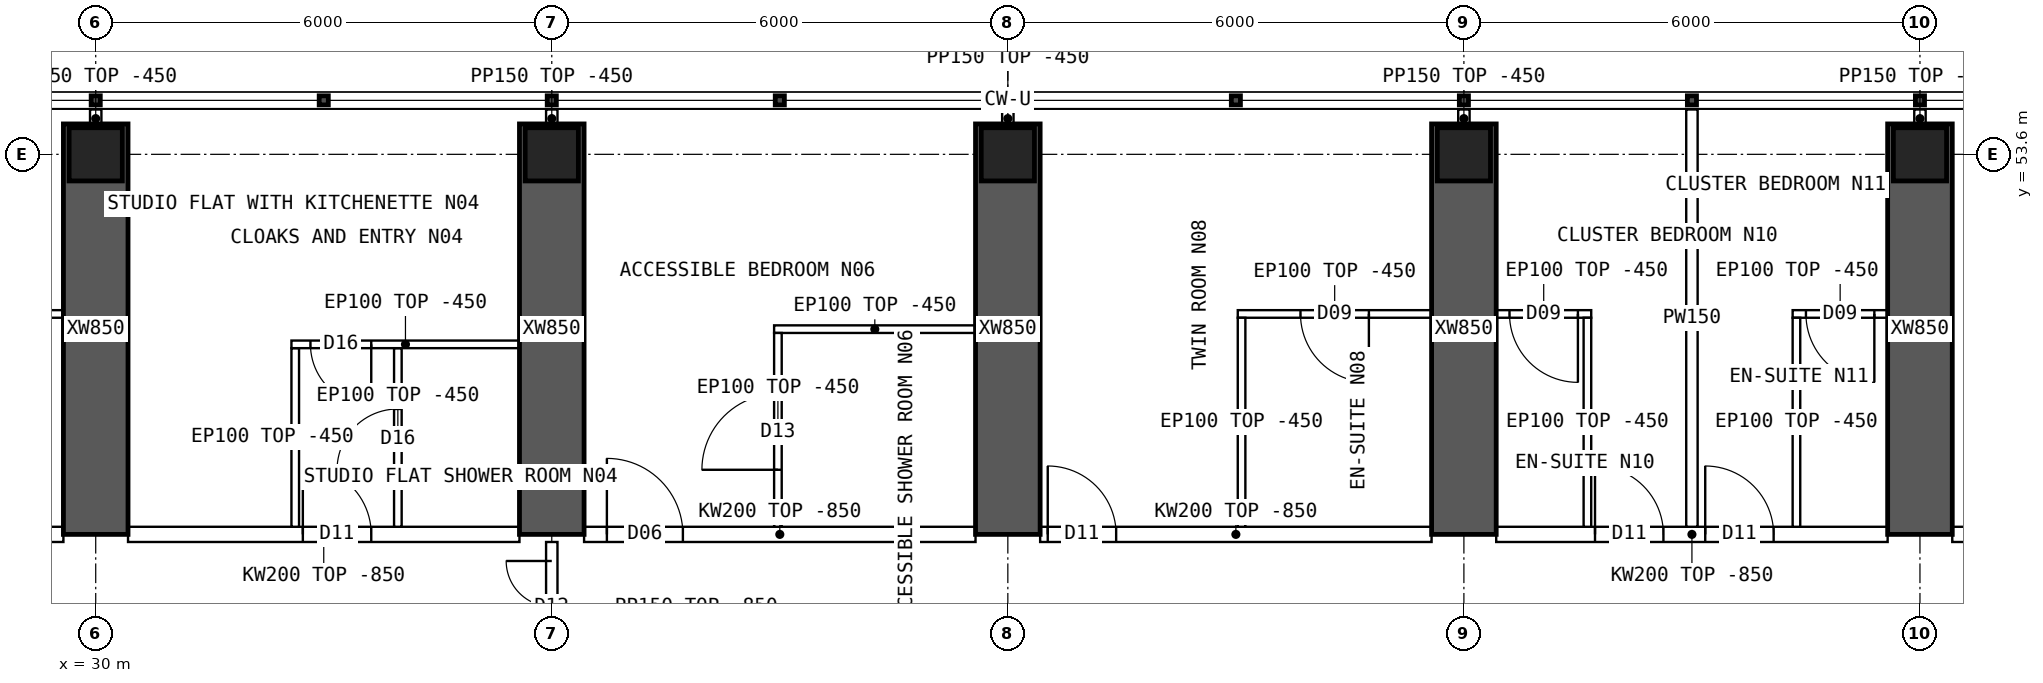
"""IFC4 building model, lengths in metres.
Left out: names, types, materials, properties, quantities, classifications, styles, units other than length and angle.
Written with IfcOpenShell. Run it as: python <this file> out.ifc"""

import sys

from ifc_helpers import new_model, si_unit, direction, frame, frame_2d, origin, origin_2d, place, context, subcontext, project, spatial, polyline, rectangle, hollow_rectangle, outline, extrude, element, fill, save


model = new_model("IFC4")
c1 = context("Model", 3, precision=1e-05, world=origin(), true_north=direction((0.0, 1.0)))
c2 = subcontext(c1, "Body", "Model", "MODEL_VIEW")
j1 = project(units=[si_unit("LENGTHUNIT", "METRE"), si_unit("PLANEANGLEUNIT", "RADIAN")], contexts=[c1])
p1 = place(None, origin())
s1 = spatial("IfcSite", under=j1, at=p1, CompositionType="ELEMENT")
p2 = place(p1, origin())
s2 = spatial("IfcBuilding", under=s1, at=p2, CompositionType="ELEMENT")
p3 = place(p2, frame((0.0, 0.0, 174.85)))
s3 = spatial("IfcBuildingStorey", under=s2, at=p3, CompositionType="ELEMENT", Elevation=174.85)
for number, where, z_axis, x_axis in (
    (1, (30.0, 53.6, 0.0), (0.0, 0.0, 1.0), (1.0, 0.0, 0.0)),
    (2, (36.0, 53.6, 0.0), (0.0, 0.0, 1.0), (1.0, 0.0, 0.0)),
    (3, (42.0, 53.6, 0.0), (0.0, 0.0, 1.0), (1.0, 0.0, 0.0)),
    (4, (48.0, 53.6, 0.0), (0.0, 0.0, 1.0), (1.0, 0.0, 0.0)),
    (5, (54.0, 53.6, 0.0), (0.0, 0.0, 1.0), (1.0, 0.0, 0.0)),
):
    element("IfcColumn", number, at=place(p3, frame(where, z_axis=z_axis, x_axis=x_axis)), inside=s3, PredefinedType="COLUMN", context=c2, shape_type="SweptSolid", body=[
        extrude(hollow_rectangle(XDim=0.7, YDim=0.7, WallThickness=0.07, at=origin_2d()), origin(), (0.0, 0.0, 1.0), 3.75),
    ])
for number, where, z_axis, x_axis in (
    (6, (30.0, 48.6, 0.0), (0.0, 0.0, 1.0), (0.0, 1.0, 0.0)),
    (7, (36.0, 48.6, 0.0), (0.0, 0.0, 1.0), (0.0, 1.0, 0.0)),
    (8, (42.0, 48.6, 0.0), (0.0, 0.0, 1.0), (0.0, 1.0, 0.0)),
    (9, (48.0, 48.6, 0.0), (0.0, 0.0, 1.0), (0.0, 1.0, 0.0)),
    (10, (54.0, 48.6, 0.0), (0.0, 0.0, 1.0), (0.0, 1.0, 0.0)),
):
    element("IfcWall", number, at=place(p3, frame(where, z_axis=z_axis, x_axis=x_axis)), inside=s3, PredefinedType="SHEAR", context=c2, shape_type="SweptSolid", body=[
        extrude(rectangle(XDim=5.4, YDim=0.85, at=frame_2d((2.7, 0.0))), origin(), (0.0, 0.0, 1.0), 3.75),
    ])
p4 = place(p3, frame((24.425, 48.6, 0.0), z_axis=(0.0, 0.0, 1.0), x_axis=(1.0, 0.0, 0.0)))
e11 = element("IfcWall", 11, at=p4, inside=s3, PredefinedType="SOLIDWALL", context=c2, shape_type="SweptSolid", body=[
    extrude(outline(polyline([(0.0, 0.0), (5.15, 0.0), (5.15, 2.9), (0.0, 2.9), (0.0, 0.0)])), frame((0.0, 0.1, 0.0), z_axis=(0.0, -1.0, 0.0), x_axis=(1.0, 0.0, 0.0)), (0.0, 0.0, 1.0), 0.2),
])
p5 = place(p4, frame((0.1, 0.0, 0.0)))
e12 = element("IfcOpeningElement", 12, at=p5, cuts=e11, PredefinedType="OPENING", context=c2, shape_type="SweptSolid", body=[
    extrude(rectangle(XDim=0.9, YDim=2.1, at=frame_2d((0.45, 1.05))), frame((0.0, 0.11, 0.0), z_axis=(0.0, -1.0, 0.0), x_axis=(1.0, 0.0, 0.0)), (0.0, 0.0, 1.0), 0.22),
])
p6 = place(p3, frame((30.425, 48.6, 0.0), z_axis=(0.0, 0.0, 1.0), x_axis=(1.0, 0.0, 0.0)))
e13 = element("IfcWall", 13, at=p6, inside=s3, PredefinedType="SOLIDWALL", context=c2, shape_type="SweptSolid", body=[
    extrude(outline(polyline([(0.0, 0.0), (5.15, 0.0), (5.15, 2.9), (0.0, 2.9), (0.0, 0.0)])), frame((0.0, 0.1, 0.0), z_axis=(0.0, -1.0, 0.0), x_axis=(1.0, 0.0, 0.0)), (0.0, 0.0, 1.0), 0.2),
])
p7 = place(p6, frame((2.3, 0.0, 0.0)))
e14 = element("IfcOpeningElement", 14, at=p7, cuts=e13, PredefinedType="OPENING", context=c2, shape_type="SweptSolid", body=[
    extrude(rectangle(XDim=0.9, YDim=2.1, at=frame_2d((0.45, 1.05))), frame((0.0, 0.11, 0.0), z_axis=(0.0, -1.0, 0.0), x_axis=(1.0, 0.0, 0.0)), (0.0, 0.0, 1.0), 0.22),
])
p8 = place(p3, frame((36.425, 48.6, 0.0), z_axis=(0.0, 0.0, 1.0), x_axis=(1.0, 0.0, 0.0)))
e15 = element("IfcWall", 15, at=p8, inside=s3, PredefinedType="SOLIDWALL", context=c2, shape_type="SweptSolid", body=[
    extrude(outline(polyline([(0.0, 0.0), (5.15, 0.0), (5.15, 2.9), (0.0, 2.9), (0.0, 0.0)])), frame((0.0, 0.1, 0.0), z_axis=(0.0, -1.0, 0.0), x_axis=(1.0, 0.0, 0.0)), (0.0, 0.0, 1.0), 0.2),
])
p9 = place(p8, frame((0.3, 0.0, 0.0)))
e16 = element("IfcOpeningElement", 16, at=p9, cuts=e15, PredefinedType="OPENING", context=c2, shape_type="SweptSolid", body=[
    extrude(rectangle(XDim=1.0, YDim=2.1, at=frame_2d((0.5, 1.05))), frame((0.0, 0.11, 0.0), z_axis=(0.0, -1.0, 0.0), x_axis=(1.0, 0.0, 0.0)), (0.0, 0.0, 1.0), 0.22),
])
p10 = place(p3, frame((42.425, 48.6, 0.0), z_axis=(0.0, 0.0, 1.0), x_axis=(1.0, 0.0, 0.0)))
e17 = element("IfcWall", 17, at=p10, inside=s3, PredefinedType="SOLIDWALL", context=c2, shape_type="SweptSolid", body=[
    extrude(outline(polyline([(0.0, 0.0), (5.15, 0.0), (5.15, 2.9), (0.0, 2.9), (0.0, 0.0)])), frame((0.0, 0.1, 0.0), z_axis=(0.0, -1.0, 0.0), x_axis=(1.0, 0.0, 0.0)), (0.0, 0.0, 1.0), 0.2),
])
p11 = place(p10, frame((0.1, 0.0, 0.0)))
e18 = element("IfcOpeningElement", 18, at=p11, cuts=e17, PredefinedType="OPENING", context=c2, shape_type="SweptSolid", body=[
    extrude(rectangle(XDim=0.9, YDim=2.1, at=frame_2d((0.45, 1.05))), frame((0.0, 0.11, 0.0), z_axis=(0.0, -1.0, 0.0), x_axis=(1.0, 0.0, 0.0)), (0.0, 0.0, 1.0), 0.22),
])
p12 = place(p3, frame((48.425, 48.6, 0.0), z_axis=(0.0, 0.0, 1.0), x_axis=(1.0, 0.0, 0.0)))
e19 = element("IfcWall", 19, at=p12, inside=s3, PredefinedType="SOLIDWALL", context=c2, shape_type="SweptSolid", body=[
    extrude(outline(polyline([(0.0, 0.0), (5.15, 0.0), (5.15, 2.9), (0.0, 2.9), (0.0, 0.0)])), frame((0.0, 0.1, 0.0), z_axis=(0.0, -1.0, 0.0), x_axis=(1.0, 0.0, 0.0)), (0.0, 0.0, 1.0), 0.2),
])
p13 = place(p12, frame((1.3, 0.0, 0.0)))
e20 = element("IfcOpeningElement", 20, at=p13, cuts=e19, PredefinedType="OPENING", context=c2, shape_type="SweptSolid", body=[
    extrude(rectangle(XDim=0.9, YDim=2.1, at=frame_2d((0.45, 1.05))), frame((0.0, 0.11, 0.0), z_axis=(0.0, -1.0, 0.0), x_axis=(1.0, 0.0, 0.0)), (0.0, 0.0, 1.0), 0.22),
])
p14 = place(p12, frame((2.75, 0.0, 0.0)))
e21 = element("IfcOpeningElement", 21, at=p14, cuts=e19, PredefinedType="OPENING", context=c2, shape_type="SweptSolid", body=[
    extrude(rectangle(XDim=0.9, YDim=2.1, at=frame_2d((0.45, 1.05))), frame((0.0, 0.11, 0.0), z_axis=(0.0, -1.0, 0.0), x_axis=(1.0, 0.0, 0.0)), (0.0, 0.0, 1.0), 0.22),
])
p15 = place(p3, frame((54.425, 48.6, 0.0), z_axis=(0.0, 0.0, 1.0), x_axis=(1.0, 0.0, 0.0)))
e22 = element("IfcWall", 22, at=p15, inside=s3, PredefinedType="SOLIDWALL", context=c2, shape_type="SweptSolid", body=[
    extrude(outline(polyline([(0.0, 0.0), (5.15, 0.0), (5.15, 2.9), (0.0, 2.9), (0.0, 0.0)])), frame((0.0, 0.1, 0.0), z_axis=(0.0, -1.0, 0.0), x_axis=(1.0, 0.0, 0.0)), (0.0, 0.0, 1.0), 0.2),
])
p16 = place(p15, frame((0.6, 0.0, 0.0)))
e23 = element("IfcOpeningElement", 23, at=p16, cuts=e22, PredefinedType="OPENING", context=c2, shape_type="SweptSolid", body=[
    extrude(rectangle(XDim=1.0, YDim=2.1, at=frame_2d((0.5, 1.05))), frame((0.0, 0.11, 0.0), z_axis=(0.0, -1.0, 0.0), x_axis=(1.0, 0.0, 0.0)), (0.0, 0.0, 1.0), 0.22),
])
p17 = place(p3, frame((27.025, 51.5, 0.0), z_axis=(0.0, 0.0, 1.0), x_axis=(1.0, 0.0, 0.0)))
e24 = element("IfcWall", 24, at=p17, inside=s3, PredefinedType="PARTITIONING", context=c2, shape_type="SweptSolid", body=[
    extrude(rectangle(XDim=2.55, YDim=0.1, at=frame_2d((1.275, 0.0))), origin(), (0.0, 0.0, 1.0), 3.3),
])
p18 = place(p17, frame((0.825, 0.0, 0.0)))
e25 = element("IfcOpeningElement", 25, at=p18, cuts=e24, PredefinedType="OPENING", context=c2, shape_type="SweptSolid", body=[
    extrude(rectangle(XDim=0.9, YDim=2.1, at=frame_2d((0.45, 1.05))), frame((0.0, 0.06, 0.0), z_axis=(0.0, -1.0, 0.0), x_axis=(1.0, 0.0, 0.0)), (0.0, 0.0, 1.0), 0.12),
])
p19 = place(p3, frame((32.575, 51.1, 0.0), z_axis=(0.0, 0.0, 1.0), x_axis=(1.0, 0.0, 0.0)))
e26 = element("IfcWall", 26, at=p19, inside=s3, PredefinedType="PARTITIONING", context=c2, shape_type="SweptSolid", body=[
    extrude(rectangle(XDim=3.0, YDim=0.1, at=frame_2d((1.5, 0.0))), origin(), (0.0, 0.0, 1.0), 3.3),
])
p20 = place(p19, frame((0.25, 0.0, 0.0)))
e27 = element("IfcOpeningElement", 27, at=p20, cuts=e26, PredefinedType="OPENING", context=c2, shape_type="SweptSolid", body=[
    extrude(rectangle(XDim=0.8, YDim=2.1, at=frame_2d((0.4, 1.05))), frame((0.0, 0.06, 0.0), z_axis=(0.0, -1.0, 0.0), x_axis=(1.0, 0.0, 0.0)), (0.0, 0.0, 1.0), 0.12),
])
p21 = place(p3, frame((32.625, 51.05, 0.0), z_axis=(0.0, 0.0, 1.0), x_axis=(0.0, -1.0, 0.0)))
e28 = element("IfcWall", 28, at=p21, inside=s3, PredefinedType="PARTITIONING", context=c2, shape_type="SweptSolid", body=[
    extrude(outline(polyline([(0.0, 0.0), (2.35, 0.0), (2.35, 2.9), (2.302, 2.9), (2.3, 3.3), (0.0, 3.3), (0.0, 0.0)])), frame((0.0, 0.05, 0.0), z_axis=(0.0, -1.0, 0.0), x_axis=(1.0, 0.0, 0.0)), (0.0, 0.0, 1.0), 0.1),
])
p22 = place(p3, frame((33.975, 51.05, 0.0), z_axis=(0.0, 0.0, 1.0), x_axis=(0.0, -1.0, 0.0)))
e29 = element("IfcWall", 29, at=p22, inside=s3, PredefinedType="PARTITIONING", context=c2, shape_type="SweptSolid", body=[
    extrude(outline(polyline([(0.0, 0.0), (2.35, 0.0), (2.35, 2.9), (2.302, 2.9), (2.3, 3.3), (0.0, 3.3), (0.0, 0.0)])), frame((0.0, 0.05, 0.0), z_axis=(0.0, -1.0, 0.0), x_axis=(1.0, 0.0, 0.0)), (0.0, 0.0, 1.0), 0.1),
])
p23 = place(p22, frame((0.8, 0.0, 0.0)))
e30 = element("IfcOpeningElement", 30, at=p23, cuts=e29, PredefinedType="OPENING", context=c2, shape_type="SweptSolid", body=[
    extrude(rectangle(XDim=0.8, YDim=2.1, at=frame_2d((0.4, 1.05))), frame((0.0, 0.06, 0.0), z_axis=(0.0, -1.0, 0.0), x_axis=(1.0, 0.0, 0.0)), (0.0, 0.0, 1.0), 0.12),
])
p24 = place(p3, frame((38.925, 51.3, 0.0), z_axis=(0.0, 0.0, 1.0), x_axis=(1.0, 0.0, 0.0)))
e31 = element("IfcWall", 31, at=p24, inside=s3, PredefinedType="PARTITIONING", context=c2, shape_type="SweptSolid", body=[
    extrude(rectangle(XDim=2.65, YDim=0.1, at=frame_2d((1.325, 0.0))), origin(), (0.0, 0.0, 1.0), 3.3),
])
p25 = place(p3, frame((38.975, 51.25, 0.0), z_axis=(0.0, 0.0, 1.0), x_axis=(0.0, -1.0, 0.0)))
e32 = element("IfcWall", 32, at=p25, inside=s3, PredefinedType="PARTITIONING", context=c2, shape_type="SweptSolid", body=[
    extrude(outline(polyline([(0.0, 0.0), (2.55, 0.0), (2.55, 2.9), (2.502, 2.9), (2.5, 3.3), (0.0, 3.3), (0.0, 0.0)])), frame((0.0, 0.05, 0.0), z_axis=(0.0, -1.0, 0.0), x_axis=(1.0, 0.0, 0.0)), (0.0, 0.0, 1.0), 0.1),
])
p26 = place(p25, frame((0.8, 0.0, 0.0)))
e33 = element("IfcOpeningElement", 33, at=p26, cuts=e32, PredefinedType="OPENING", context=c2, shape_type="SweptSolid", body=[
    extrude(rectangle(XDim=1.0, YDim=2.1, at=frame_2d((0.5, 1.05))), frame((0.0, 0.06, 0.0), z_axis=(0.0, -1.0, 0.0), x_axis=(1.0, 0.0, 0.0)), (0.0, 0.0, 1.0), 0.12),
])
p27 = place(p3, frame((45.025, 51.5, 0.0), z_axis=(0.0, 0.0, 1.0), x_axis=(1.0, 0.0, 0.0)))
e34 = element("IfcWall", 34, at=p27, inside=s3, PredefinedType="PARTITIONING", context=c2, shape_type="SweptSolid", body=[
    extrude(rectangle(XDim=2.55, YDim=0.1, at=frame_2d((1.275, 0.0))), origin(), (0.0, 0.0, 1.0), 3.3),
])
p28 = place(p27, frame((0.825, 0.0, 0.0)))
e35 = element("IfcOpeningElement", 35, at=p28, cuts=e34, PredefinedType="OPENING", context=c2, shape_type="SweptSolid", body=[
    extrude(rectangle(XDim=0.9, YDim=2.1, at=frame_2d((0.45, 1.05))), frame((0.0, 0.06, 0.0), z_axis=(0.0, -1.0, 0.0), x_axis=(1.0, 0.0, 0.0)), (0.0, 0.0, 1.0), 0.12),
])
p29 = place(p3, frame((45.075, 51.45, 0.0), z_axis=(0.0, 0.0, 1.0), x_axis=(0.0, -1.0, 0.0)))
e36 = element("IfcWall", 36, at=p29, inside=s3, PredefinedType="PARTITIONING", context=c2, shape_type="SweptSolid", body=[
    extrude(outline(polyline([(0.0, 0.0), (2.75, 0.0), (2.75, 2.9), (2.702, 2.9), (2.7, 3.3), (0.0, 3.3), (0.0, 0.0)])), frame((0.0, 0.05, 0.0), z_axis=(0.0, -1.0, 0.0), x_axis=(1.0, 0.0, 0.0)), (0.0, 0.0, 1.0), 0.1),
])
p30 = place(p3, frame((51.0, 54.19, 0.0), z_axis=(0.0, 0.0, 1.0), x_axis=(0.0, -1.0, 0.0)))
e37 = element("IfcWall", 37, at=p30, inside=s3, PredefinedType="PARTITIONING", context=c2, shape_type="SweptSolid", body=[
    extrude(outline(polyline([(0.0, 0.0), (5.49, 0.0), (5.49, 2.9), (5.442, 2.9), (5.44, 3.3), (0.792, 3.3), (0.79, 2.9), (0.392, 2.9), (0.39, 3.3), (0.0, 3.3), (0.0, 0.0)])), frame((0.0, 0.075, 0.0), z_axis=(0.0, -1.0, 0.0), x_axis=(1.0, 0.0, 0.0)), (0.0, 0.0, 1.0), 0.15),
])
p31 = place(p3, frame((48.425, 51.5, 0.0), z_axis=(0.0, 0.0, 1.0), x_axis=(1.0, 0.0, 0.0)))
e38 = element("IfcWall", 38, at=p31, inside=s3, PredefinedType="PARTITIONING", context=c2, shape_type="SweptSolid", body=[
    extrude(rectangle(XDim=1.25, YDim=0.1, at=frame_2d((0.625, 0.0))), origin(), (0.0, 0.0, 1.0), 3.3),
])
p32 = place(p31, frame((0.175, 0.0, 0.0)))
e39 = element("IfcOpeningElement", 39, at=p32, cuts=e38, PredefinedType="OPENING", context=c2, shape_type="SweptSolid", body=[
    extrude(rectangle(XDim=0.9, YDim=2.1, at=frame_2d((0.45, 1.05))), frame((0.0, 0.06, 0.0), z_axis=(0.0, -1.0, 0.0), x_axis=(1.0, 0.0, 0.0)), (0.0, 0.0, 1.0), 0.12),
])
p33 = place(p3, frame((49.625, 51.45, 0.0), z_axis=(0.0, 0.0, 1.0), x_axis=(0.0, -1.0, 0.0)))
e40 = element("IfcWall", 40, at=p33, inside=s3, PredefinedType="PARTITIONING", context=c2, shape_type="SweptSolid", body=[
    extrude(outline(polyline([(0.0, 0.0), (2.75, 0.0), (2.75, 2.9), (2.702, 2.9), (2.7, 3.3), (0.0, 3.3), (0.0, 0.0)])), frame((0.0, 0.05, 0.0), z_axis=(0.0, -1.0, 0.0), x_axis=(1.0, 0.0, 0.0)), (0.0, 0.0, 1.0), 0.1),
])
p34 = place(p3, frame((52.325, 51.5, 0.0), z_axis=(0.0, 0.0, 1.0), x_axis=(1.0, 0.0, 0.0)))
e41 = element("IfcWall", 41, at=p34, inside=s3, PredefinedType="PARTITIONING", context=c2, shape_type="SweptSolid", body=[
    extrude(rectangle(XDim=1.25, YDim=0.1, at=frame_2d((0.625, 0.0))), origin(), (0.0, 0.0, 1.0), 3.3),
])
p35 = place(p34, frame((0.175, 0.0, 0.0)))
e42 = element("IfcOpeningElement", 42, at=p35, cuts=e41, PredefinedType="OPENING", context=c2, shape_type="SweptSolid", body=[
    extrude(rectangle(XDim=0.9, YDim=2.1, at=frame_2d((0.45, 1.05))), frame((0.0, 0.06, 0.0), z_axis=(0.0, -1.0, 0.0), x_axis=(1.0, 0.0, 0.0)), (0.0, 0.0, 1.0), 0.12),
])
p36 = place(p3, frame((52.375, 51.45, 0.0), z_axis=(0.0, 0.0, 1.0), x_axis=(0.0, -1.0, 0.0)))
e43 = element("IfcWall", 43, at=p36, inside=s3, PredefinedType="PARTITIONING", context=c2, shape_type="SweptSolid", body=[
    extrude(outline(polyline([(0.0, 0.0), (2.75, 0.0), (2.75, 2.9), (2.702, 2.9), (2.7, 3.3), (0.0, 3.3), (0.0, 0.0)])), frame((0.0, 0.05, 0.0), z_axis=(0.0, -1.0, 0.0), x_axis=(1.0, 0.0, 0.0)), (0.0, 0.0, 1.0), 0.1),
])
p37 = place(p3, frame((36.0, 46.8, 0.0), z_axis=(0.0, 0.0, 1.0), x_axis=(0.0, 1.0, 0.0)))
e44 = element("IfcWall", 44, at=p37, inside=s3, PredefinedType="PARTITIONING", context=c2, shape_type="SweptSolid", body=[
    extrude(outline(polyline([(0.0, 0.0), (1.7, 0.0), (1.7, 2.9), (0.0, 2.9), (0.0, 0.0)])), frame((0.0, 0.075, 0.0), z_axis=(0.0, -1.0, 0.0), x_axis=(1.0, 0.0, 0.0)), (0.0, 0.0, 1.0), 0.15),
])
p38 = place(p37, frame((0.25, 0.0, 0.0)))
e45 = element("IfcOpeningElement", 45, at=p38, cuts=e44, PredefinedType="OPENING", context=c2, shape_type="SweptSolid", body=[
    extrude(rectangle(XDim=1.2, YDim=2.1, at=frame_2d((0.6, 1.05))), frame((0.0, 0.085, 0.0), z_axis=(0.0, -1.0, 0.0), x_axis=(1.0, 0.0, 0.0)), (0.0, 0.0, 1.0), 0.17),
])
for number, where, z_axis, x_axis in (
    (46, (30.0, 53.95, 0.0), (0.0, 0.0, 1.0), (0.0, 1.0, 0.0)),
    (47, (36.0, 53.95, 0.0), (0.0, 0.0, 1.0), (0.0, 1.0, 0.0)),
    (48, (42.0, 53.95, 0.0), (0.0, 0.0, 1.0), (0.0, 1.0, 0.0)),
    (49, (48.0, 53.95, 0.0), (0.0, 0.0, 1.0), (0.0, 1.0, 0.0)),
    (50, (54.0, 53.95, 0.0), (0.0, 0.0, 1.0), (0.0, 1.0, 0.0)),
):
    element("IfcWall", number, at=place(p3, frame(where, z_axis=z_axis, x_axis=x_axis)), inside=s3, PredefinedType="PARTITIONING", context=c2, shape_type="SweptSolid", body=[
        extrude(rectangle(XDim=0.24, YDim=0.15, at=frame_2d((0.12, 0.0))), origin(), (0.0, 0.0, 1.0), 3.3),
    ])
p39 = place(p20, origin())
e51 = element("IfcDoor", 51, at=p39, inside=s3, OperationType="SINGLE_SWING_RIGHT", PredefinedType="DOOR", context=c2, shape_type="SweptSolid", body=[
    extrude(rectangle(XDim=0.8, YDim=2.1, at=frame_2d((0.4, 1.05))), frame((0.0, 0.025, 0.0), z_axis=(0.0, -1.0, 0.0), x_axis=(1.0, 0.0, 0.0)), (0.0, 0.0, 1.0), 0.05),
])
fill(e27, e51)
p40 = place(p23, origin())
e52 = element("IfcDoor", 52, at=p40, inside=s3, OperationType="SINGLE_SWING_RIGHT", PredefinedType="DOOR", context=c2, shape_type="SweptSolid", body=[
    extrude(rectangle(XDim=0.8, YDim=2.1, at=frame_2d((0.4, 1.05))), frame((0.0, 0.025, 0.0), z_axis=(0.0, -1.0, 0.0), x_axis=(1.0, 0.0, 0.0)), (0.0, 0.0, 1.0), 0.05),
])
fill(e30, e52)
p41 = place(p7, origin())
e53 = element("IfcDoor", 53, at=p41, inside=s3, OperationType="SINGLE_SWING_LEFT", PredefinedType="DOOR", context=c2, shape_type="SweptSolid", body=[
    extrude(rectangle(XDim=0.9, YDim=2.1, at=frame_2d((0.45, 1.05))), frame((0.0, 0.025, 0.0), z_axis=(0.0, -1.0, 0.0), x_axis=(1.0, 0.0, 0.0)), (0.0, 0.0, 1.0), 0.05),
])
fill(e14, e53)
p42 = place(p26, origin())
e54 = element("IfcDoor", 54, at=p42, inside=s3, OperationType="SINGLE_SWING_RIGHT", PredefinedType="DOOR", context=c2, shape_type="SweptSolid", body=[
    extrude(rectangle(XDim=1.0, YDim=2.1, at=frame_2d((0.5, 1.05))), frame((0.0, 0.025, 0.0), z_axis=(0.0, -1.0, 0.0), x_axis=(1.0, 0.0, 0.0)), (0.0, 0.0, 1.0), 0.05),
])
fill(e33, e54)
p43 = place(p9, origin())
e55 = element("IfcDoor", 55, at=p43, inside=s3, OperationType="SINGLE_SWING_LEFT", PredefinedType="DOOR", context=c2, shape_type="SweptSolid", body=[
    extrude(rectangle(XDim=1.0, YDim=2.1, at=frame_2d((0.5, 1.05))), frame((0.0, 0.025, 0.0), z_axis=(0.0, -1.0, 0.0), x_axis=(1.0, 0.0, 0.0)), (0.0, 0.0, 1.0), 0.05),
])
fill(e16, e55)
p44 = place(p28, origin())
e56 = element("IfcDoor", 56, at=p44, inside=s3, OperationType="SINGLE_SWING_RIGHT", PredefinedType="DOOR", context=c2, shape_type="SweptSolid", body=[
    extrude(rectangle(XDim=0.9, YDim=2.1, at=frame_2d((0.45, 1.05))), frame((0.0, 0.025, 0.0), z_axis=(0.0, -1.0, 0.0), x_axis=(1.0, 0.0, 0.0)), (0.0, 0.0, 1.0), 0.05),
])
fill(e35, e56)
p45 = place(p11, origin())
e57 = element("IfcDoor", 57, at=p45, inside=s3, OperationType="SINGLE_SWING_LEFT", PredefinedType="DOOR", context=c2, shape_type="SweptSolid", body=[
    extrude(rectangle(XDim=0.9, YDim=2.1, at=frame_2d((0.45, 1.05))), frame((0.0, 0.025, 0.0), z_axis=(0.0, -1.0, 0.0), x_axis=(1.0, 0.0, 0.0)), (0.0, 0.0, 1.0), 0.05),
])
fill(e18, e57)
p46 = place(p32, origin())
e58 = element("IfcDoor", 58, at=p46, inside=s3, OperationType="SINGLE_SWING_RIGHT", PredefinedType="DOOR", context=c2, shape_type="SweptSolid", body=[
    extrude(rectangle(XDim=0.9, YDim=2.1, at=frame_2d((0.45, 1.05))), frame((0.0, 0.025, 0.0), z_axis=(0.0, -1.0, 0.0), x_axis=(1.0, 0.0, 0.0)), (0.0, 0.0, 1.0), 0.05),
])
fill(e39, e58)
p47 = place(p13, origin())
e59 = element("IfcDoor", 59, at=p47, inside=s3, OperationType="SINGLE_SWING_LEFT", PredefinedType="DOOR", context=c2, shape_type="SweptSolid", body=[
    extrude(rectangle(XDim=0.9, YDim=2.1, at=frame_2d((0.45, 1.05))), frame((0.0, 0.025, 0.0), z_axis=(0.0, -1.0, 0.0), x_axis=(1.0, 0.0, 0.0)), (0.0, 0.0, 1.0), 0.05),
])
fill(e20, e59)
p48 = place(p35, origin())
e60 = element("IfcDoor", 60, at=p48, inside=s3, OperationType="SINGLE_SWING_RIGHT", PredefinedType="DOOR", context=c2, shape_type="SweptSolid", body=[
    extrude(rectangle(XDim=0.9, YDim=2.1, at=frame_2d((0.45, 1.05))), frame((0.0, 0.025, 0.0), z_axis=(0.0, -1.0, 0.0), x_axis=(1.0, 0.0, 0.0)), (0.0, 0.0, 1.0), 0.05),
])
fill(e42, e60)
p49 = place(p14, origin())
e61 = element("IfcDoor", 61, at=p49, inside=s3, OperationType="SINGLE_SWING_LEFT", PredefinedType="DOOR", context=c2, shape_type="SweptSolid", body=[
    extrude(rectangle(XDim=0.9, YDim=2.1, at=frame_2d((0.45, 1.05))), frame((0.0, 0.025, 0.0), z_axis=(0.0, -1.0, 0.0), x_axis=(1.0, 0.0, 0.0)), (0.0, 0.0, 1.0), 0.05),
])
fill(e21, e61)
p50 = place(p38, origin())
e62 = element("IfcDoor", 62, at=p50, inside=s3, OperationType="DOUBLE_DOOR_SINGLE_SWING", PredefinedType="DOOR", context=c2, shape_type="SweptSolid", body=[
    extrude(rectangle(XDim=1.2, YDim=2.1, at=frame_2d((0.6, 1.05))), frame((0.0, 0.025, 0.0), z_axis=(0.0, -1.0, 0.0), x_axis=(1.0, 0.0, 0.0)), (0.0, 0.0, 1.0), 0.05),
])
fill(e45, e62)
save(model, sys.argv[1])
